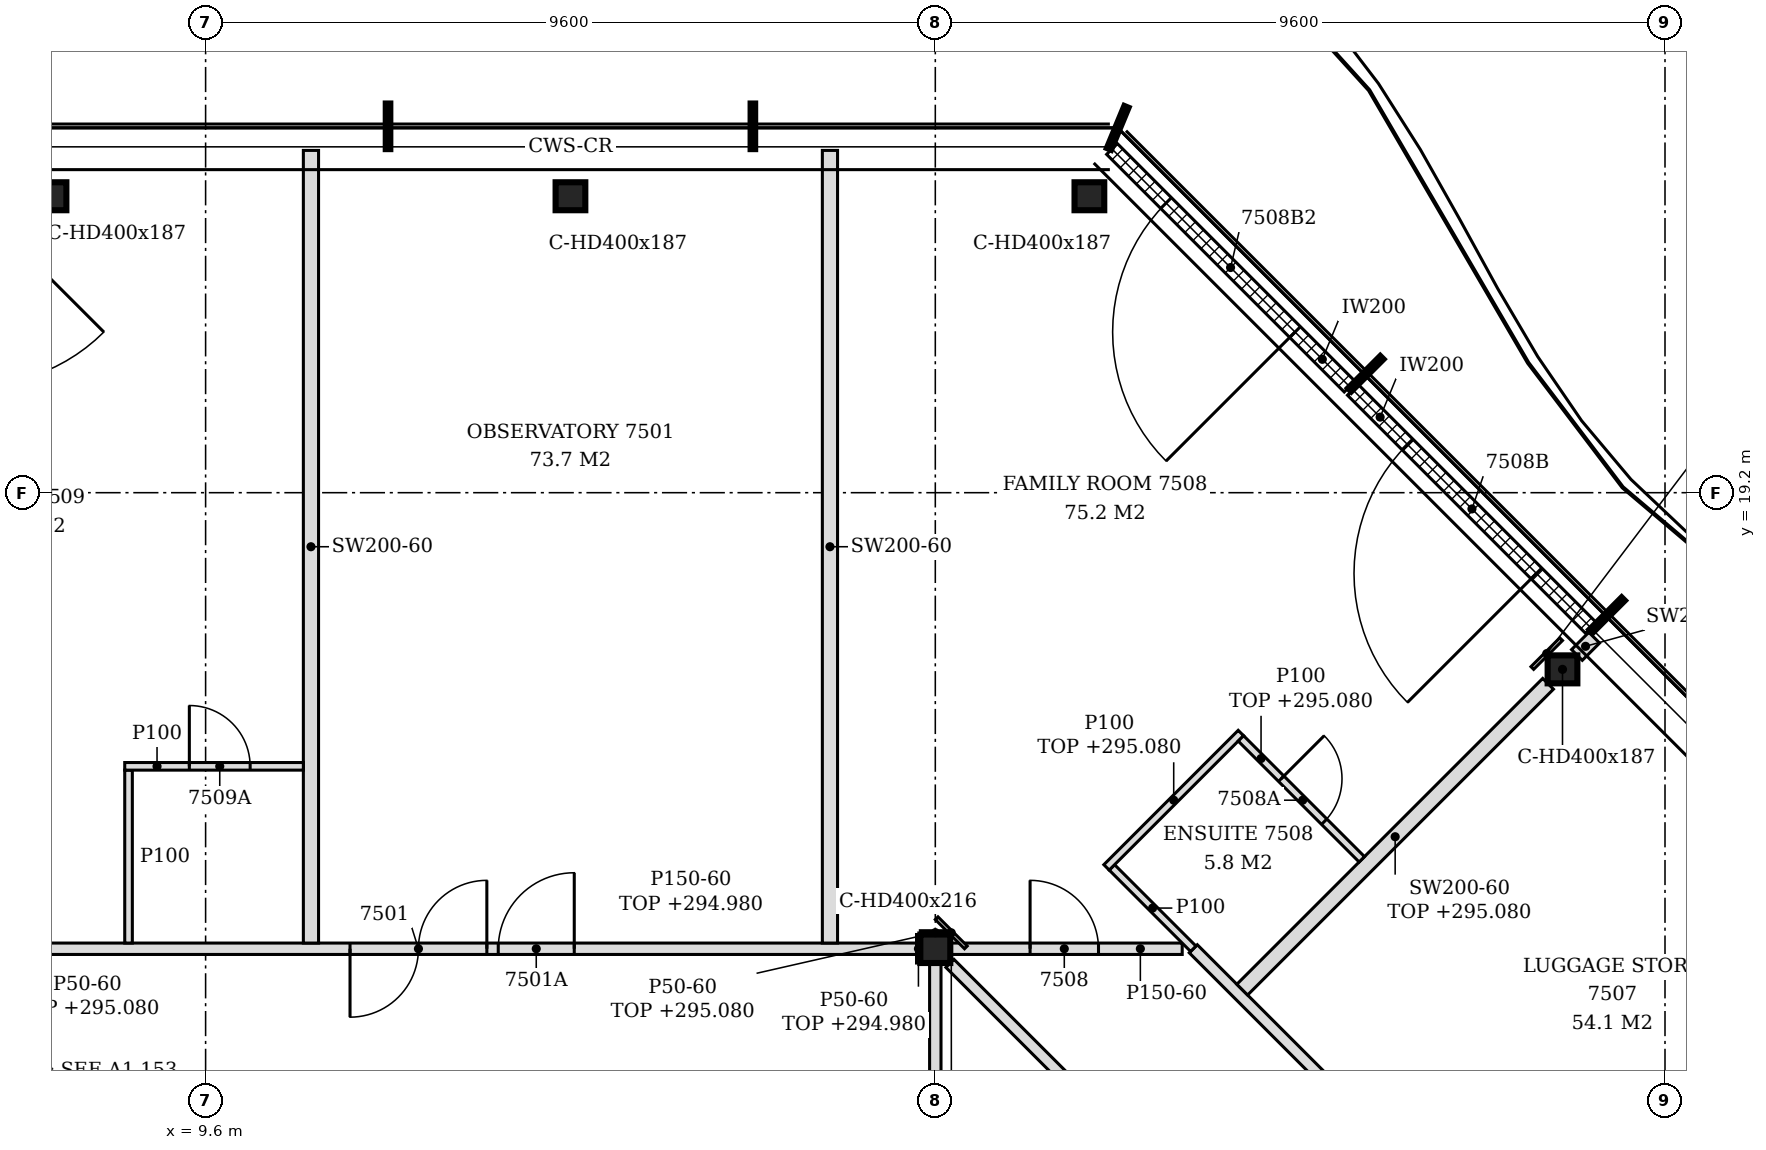
"""IFC4 building model, lengths in metres.
Left out: names, types, materials, properties, quantities, classifications, styles, units other than length and angle.
Written with IfcOpenShell. Run it as: python <this file> out.ifc"""

import sys

from ifc_helpers import new_model, si_unit, direction, frame, frame_2d, origin, origin_2d, place, context, subcontext, project, spatial, polyline, rectangle, i_section, outline, extrude, element, fill, save


model = new_model("IFC4")
c1 = context("Model", 3, precision=1e-05, world=origin(), true_north=direction((0.0, 1.0)))
c2 = subcontext(c1, "Body", "Model", "MODEL_VIEW")
j1 = project(units=[si_unit("LENGTHUNIT", "METRE"), si_unit("PLANEANGLEUNIT", "RADIAN")], contexts=[c1])
p1 = place(None, origin())
s1 = spatial("IfcSite", under=j1, at=p1, CompositionType="ELEMENT")
p2 = place(p1, origin())
s2 = spatial("IfcBuilding", under=s1, at=p2, CompositionType="ELEMENT")
p3 = place(p2, frame((0.0, 0.0, 292.2)))
s3 = spatial("IfcBuildingStorey", under=s2, at=p3, CompositionType="ELEMENT", Elevation=292.2)
for number, where, z_axis, x_axis in (
    (1, (27.451, 16.876, -0.15), (0.0, 0.0, 1.0), (1.0, 0.0, 0.0)),
    (2, (21.227, 23.1, -0.15), (0.0, 0.0, 1.0), (1.0, 0.0, 0.0)),
    (3, (14.4, 23.1, -0.15), (0.0, 0.0, 1.0), (1.0, 0.0, 0.0)),
    (4, (7.573, 23.1, -0.15), (0.0, 0.0, 1.0), (1.0, 0.0, 0.0)),
):
    element("IfcColumn", number, at=place(p3, frame(where, z_axis=z_axis, x_axis=x_axis)), inside=s3, PredefinedType="COLUMN", context=c2, shape_type="SweptSolid", body=[
        extrude(i_section(OverallWidth=0.391, OverallDepth=0.368, WebThickness=0.015, FlangeThickness=0.024, FilletRadius=0.015, at=origin_2d()), origin(), (0.0, 0.0, 1.0), 3.55),
    ])
p4 = place(p3, frame((19.2, 13.2, -0.15), z_axis=(0.0, 0.0, 1.0), x_axis=(1.0, 0.0, 0.0)))
e5 = element("IfcColumn", 5, at=p4, inside=s3, PredefinedType="COLUMN", context=c2, shape_type="SweptSolid", body=[
    extrude(i_section(OverallWidth=0.394, OverallDepth=0.375, WebThickness=0.017, FlangeThickness=0.028, FilletRadius=0.015, at=origin_2d()), origin(), (0.0, 0.0, 1.0), 3.55),
])
p5 = place(p3, frame((27.826, 17.42, 0.0), z_axis=(0.0, 0.0, 1.0), x_axis=(-0.707079231393, 0.707134329907, 0.0)))
e6 = element("IfcWall", 6, at=p5, inside=s3, PredefinedType="NOTDEFINED", context=c2, shape_type="SweptSolid", body=[
    extrude(rectangle(XDim=4.431, YDim=0.2, at=frame_2d((2.215, 0.0))), origin(), (0.0, 0.0, 1.0), 3.4),
])
p6 = place(p5, frame((1.015, 0.0, 0.0)))
e7 = element("IfcOpeningElement", 7, at=p6, cuts=e6, PredefinedType="OPENING", context=c2, shape_type="SweptSolid", body=[
    extrude(rectangle(XDim=2.4, YDim=2.4, at=frame_2d((1.2, 1.2))), frame((0.0, 0.11, 0.0), z_axis=(0.0, -1.0, 0.0), x_axis=(1.0, 0.0, 0.0)), (0.0, 0.0, 1.0), 0.22),
])
p7 = place(p3, frame((24.651, 20.596, 0.0), z_axis=(0.0, 0.0, 1.0), x_axis=(-0.707134392299, 0.707079168996, 0.0)))
e8 = element("IfcWall", 8, at=p7, inside=s3, PredefinedType="NOTDEFINED", context=c2, shape_type="SweptSolid", body=[
    extrude(rectangle(XDim=4.421, YDim=0.2, at=frame_2d((2.21, 0.0))), origin(), (0.0, 0.0, 1.0), 3.4),
])
p8 = place(p7, frame((1.015, 0.0, 0.0)))
e9 = element("IfcOpeningElement", 9, at=p8, cuts=e8, PredefinedType="OPENING", context=c2, shape_type="SweptSolid", body=[
    extrude(rectangle(XDim=2.4, YDim=2.4, at=frame_2d((1.2, 1.2))), frame((0.0, 0.11, 0.0), z_axis=(0.0, -1.0, 0.0), x_axis=(1.0, 0.0, 0.0)), (0.0, 0.0, 1.0), 0.22),
])
p9 = place(p3, frame((19.2, 3.675, 0.0), z_axis=(0.0, 0.0, 1.0), x_axis=(0.0, 1.0, 0.0)))
e10 = element("IfcWall", 10, at=p9, inside=s3, PredefinedType="PARTITIONING", context=c2, shape_type="SweptSolid", body=[
    extrude(rectangle(XDim=9.337, YDim=0.15, at=frame_2d((4.669, 0.0))), origin(), (0.0, 0.0, 1.0), 2.78),
])
p10 = place(p3, frame((28.672, 3.728, 0.0), z_axis=(0.0, 0.0, 1.0), x_axis=(-0.707106781187, 0.707106781187, 0.0)))
e11 = element("IfcWall", 11, at=p10, inside=s3, PredefinedType="PARTITIONING", context=c2, shape_type="SweptSolid", body=[
    extrude(rectangle(XDim=13.124, YDim=0.15, at=frame_2d((6.562, 0.0))), origin(), (0.0, 0.0, 1.0), 2.83),
])
p11 = place(p10, frame((6.157, 0.0, 0.0)))
e12 = element("IfcOpeningElement", 12, at=p11, cuts=e11, PredefinedType="OPENING", context=c2, shape_type="SweptSolid", body=[
    extrude(rectangle(XDim=0.9, YDim=2.1, at=frame_2d((0.45, 1.05))), frame((0.0, 0.085, 0.0), z_axis=(0.0, -1.0, 0.0), x_axis=(1.0, 0.0, 0.0)), (0.0, 0.0, 1.0), 0.17),
])
p12 = place(p3, frame((31.072, 4.722, 0.0), z_axis=(0.0, 0.0, 1.0), x_axis=(-0.707106781187, 0.707106781187, 0.0)))
e13 = element("IfcWall", 13, at=p12, inside=s3, PredefinedType="PARTITIONING", context=c2, shape_type="SweptSolid", body=[
    extrude(rectangle(XDim=11.99, YDim=0.15, at=frame_2d((5.995, 0.0))), origin(), (0.0, 0.0, 1.0), 2.83),
])
p13 = place(p12, frame((1.139, 0.0, 0.0)))
e14 = element("IfcOpeningElement", 14, at=p13, cuts=e13, PredefinedType="OPENING", context=c2, shape_type="SweptSolid", body=[
    extrude(rectangle(XDim=0.9, YDim=2.1, at=frame_2d((0.45, 1.05))), frame((0.0, 0.085, 0.0), z_axis=(0.0, -1.0, 0.0), x_axis=(1.0, 0.0, 0.0)), (0.0, 0.0, 1.0), 0.17),
])
p14 = place(p12, frame((6.806, 0.0, 0.0)))
e15 = element("IfcOpeningElement", 15, at=p14, cuts=e13, PredefinedType="OPENING", context=c2, shape_type="SweptSolid", body=[
    extrude(rectangle(XDim=0.9, YDim=2.1, at=frame_2d((0.45, 1.05))), frame((0.0, 0.085, 0.0), z_axis=(0.0, -1.0, 0.0), x_axis=(1.0, 0.0, 0.0)), (0.0, 0.0, 1.0), 0.17),
])
p15 = place(p3, frame((23.238, 12.662, 0.0), z_axis=(0.0, 0.0, 1.0), x_axis=(0.707106781187, 0.707106781187, 0.0)))
e16 = element("IfcWall", 16, at=p15, inside=s3, PredefinedType="PARTITIONING", context=c2, shape_type="SweptSolid", body=[
    extrude(rectangle(XDim=5.69, YDim=0.2, at=frame_2d((2.845, 0.0))), origin(), (0.0, 0.0, 1.0), 2.88),
])
p16 = place(p3, frame((7.397, 13.2, 0.0), z_axis=(0.0, 0.0, 1.0), x_axis=(1.0, 0.0, 0.0)))
e17 = element("IfcWall", 17, at=p16, inside=s3, PredefinedType="PARTITIONING", context=c2, shape_type="SweptSolid", body=[
    extrude(rectangle(XDim=11.606, YDim=0.15, at=frame_2d((5.803, 0.0))), origin(), (0.0, 0.0, 1.0), 2.78),
])
p17 = place(p16, frame((4.103, 0.0, 0.0)))
e18 = element("IfcOpeningElement", 18, at=p17, cuts=e17, PredefinedType="OPENING", context=c2, shape_type="SweptSolid", body=[
    extrude(rectangle(XDim=1.8, YDim=2.1, at=frame_2d((0.9, 1.05))), frame((0.0, 0.085, 0.0), z_axis=(0.0, -1.0, 0.0), x_axis=(1.0, 0.0, 0.0)), (0.0, 0.0, 1.0), 0.17),
])
p18 = place(p16, frame((6.053, 0.0, 0.0)))
e19 = element("IfcOpeningElement", 19, at=p18, cuts=e17, PredefinedType="OPENING", context=c2, shape_type="SweptSolid", body=[
    extrude(rectangle(XDim=1.0, YDim=2.1, at=frame_2d((0.5, 1.05))), frame((0.0, 0.085, 0.0), z_axis=(0.0, -1.0, 0.0), x_axis=(1.0, 0.0, 0.0)), (0.0, 0.0, 1.0), 0.17),
])
p19 = place(p3, frame((19.397, 13.2, 0.0), z_axis=(0.0, 0.0, 1.0), x_axis=(1.0, 0.0, 0.0)))
e20 = element("IfcWall", 20, at=p19, inside=s3, PredefinedType="PARTITIONING", context=c2, shape_type="SweptSolid", body=[
    extrude(rectangle(XDim=3.051, YDim=0.15, at=frame_2d((1.526, 0.0))), origin(), (0.0, 0.0, 1.0), 3.4),
])
p20 = place(p19, frame((1.05, 0.0, 0.0)))
e21 = element("IfcOpeningElement", 21, at=p20, cuts=e20, PredefinedType="OPENING", context=c2, shape_type="SweptSolid", body=[
    extrude(rectangle(XDim=0.9, YDim=2.1, at=frame_2d((0.45, 1.05))), frame((0.0, 0.085, 0.0), z_axis=(0.0, -1.0, 0.0), x_axis=(1.0, 0.0, 0.0)), (0.0, 0.0, 1.0), 0.17),
])
p21 = place(p3, frame((22.594, 13.2, 0.0), z_axis=(0.0, 0.0, 1.0), x_axis=(-0.707106781187, 0.707106781187, 0.0)))
e22 = element("IfcWall", 22, at=p21, inside=s3, PredefinedType="PARTITIONING", context=c2, shape_type="SweptSolid", body=[
    extrude(rectangle(XDim=1.514, YDim=0.1, at=frame_2d((0.757, 0.0))), origin(), (0.0, 0.0, 1.0), 3.4),
])
p22 = place(p3, frame((8.586, 13.275, 0.0), z_axis=(0.0, 0.0, 1.0), x_axis=(0.0, 1.0, 0.0)))
e23 = element("IfcWall", 23, at=p22, inside=s3, PredefinedType="PARTITIONING", context=c2, shape_type="SweptSolid", body=[
    extrude(outline(polyline([(0.0, 0.0), (2.275, 0.0), (2.275, 3.4), (0.075, 3.4), (0.073, 2.78), (0.0, 2.78), (0.0, 0.0)])), frame((0.0, 0.05, 0.0), z_axis=(0.0, -1.0, 0.0), x_axis=(1.0, 0.0, 0.0)), (0.0, 0.0, 1.0), 0.1),
])
for number, where, z_axis, x_axis in (
    (24, (10.986, 13.275, 0.0), (0.0, 0.0, 1.0), (0.0, 1.0, 0.0)),
    (25, (17.814, 13.275, 0.0), (0.0, 0.0, 1.0), (0.0, 1.0, 0.0)),
):
    element("IfcWall", number, at=place(p3, frame(where, z_axis=z_axis, x_axis=x_axis)), inside=s3, PredefinedType="PARTITIONING", context=c2, shape_type="SweptSolid", body=[
        extrude(outline(polyline([(0.0, 0.0), (10.428, 0.0), (10.428, 3.4), (9.975, 3.4), (9.973, 2.88), (9.675, 2.88), (9.673, 3.4), (6.03, 3.4), (6.028, 2.83), (5.82, 2.83), (5.818, 3.4), (0.075, 3.4), (0.073, 2.78), (0.0, 2.78), (0.0, 0.0)])), frame((0.0, 0.1, 0.0), z_axis=(0.0, -1.0, 0.0), x_axis=(1.0, 0.0, 0.0)), (0.0, 0.0, 1.0), 0.2),
    ])
p23 = place(p3, frame((21.453, 14.271, 0.0), z_axis=(0.0, 0.0, 1.0), x_axis=(0.707057949532, 0.707155609469, 0.0)))
e26 = element("IfcWall", 26, at=p23, inside=s3, PredefinedType="PARTITIONING", context=c2, shape_type="SweptSolid", body=[
    extrude(rectangle(XDim=2.5, YDim=0.1, at=frame_2d((1.25, 0.0))), origin(), (0.0, 0.0, 1.0), 2.88),
])
p24 = place(p3, frame((24.811, 14.377, 0.0), z_axis=(0.0, 0.0, 1.0), x_axis=(-0.707106781187, 0.707106781187, 0.0)))
e27 = element("IfcWall", 27, at=p24, inside=s3, PredefinedType="PARTITIONING", context=c2, shape_type="SweptSolid", body=[
    extrude(rectangle(XDim=2.25, YDim=0.1, at=frame_2d((1.125, 0.0))), origin(), (0.0, 0.0, 1.0), 2.88),
])
p25 = place(p24, frame((0.7, 0.0, 0.0)))
e28 = element("IfcOpeningElement", 28, at=p25, cuts=e27, PredefinedType="OPENING", context=c2, shape_type="SweptSolid", body=[
    extrude(rectangle(XDim=0.8, YDim=2.1, at=frame_2d((0.4, 1.05))), frame((0.0, 0.06, 0.0), z_axis=(0.0, -1.0, 0.0), x_axis=(1.0, 0.0, 0.0)), (0.0, 0.0, 1.0), 0.12),
])
p26 = place(p3, frame((8.536, 15.6, 0.0), z_axis=(0.0, 0.0, 1.0), x_axis=(1.0, 0.0, 0.0)))
e29 = element("IfcWall", 29, at=p26, inside=s3, PredefinedType="PARTITIONING", context=c2, shape_type="SweptSolid", body=[
    extrude(rectangle(XDim=2.35, YDim=0.1, at=frame_2d((1.175, 0.0))), origin(), (0.0, 0.0, 1.0), 3.4),
])
p27 = place(p26, frame((0.85, 0.0, 0.0)))
e30 = element("IfcOpeningElement", 30, at=p27, cuts=e29, PredefinedType="OPENING", context=c2, shape_type="SweptSolid", body=[
    extrude(rectangle(XDim=0.8, YDim=2.1, at=frame_2d((0.4, 1.05))), frame((0.0, 0.06, 0.0), z_axis=(0.0, -1.0, 0.0), x_axis=(1.0, 0.0, 0.0)), (0.0, 0.0, 1.0), 0.12),
])
p28 = place(p3, frame((27.641, 17.065, 0.0), z_axis=(0.0, 0.0, 1.0), x_axis=(0.707106781187, 0.707106781187, 0.0)))
e31 = element("IfcWall", 31, at=p28, inside=s3, PredefinedType="PARTITIONING", context=c2, shape_type="SweptSolid", body=[
    extrude(rectangle(XDim=0.322, YDim=0.2, at=frame_2d((0.161, 0.0))), origin(), (0.0, 0.0, 1.0), 3.4),
])
p29 = place(p3, frame((18.978, 13.012, 0.0), z_axis=(0.0, 0.0, 1.0), x_axis=(0.0, 1.0, 0.0)))
e32 = element("IfcWall", 32, at=p29, inside=s3, PredefinedType="PARTITIONING", context=c2, shape_type="SweptSolid", body=[
    extrude(rectangle(XDim=0.375, YDim=0.05, at=frame_2d((0.188, 0.0))), origin(), (0.0, 0.0, 1.0), 2.78),
])
p30 = place(p3, frame((19.602, 13.218, 0.0), z_axis=(0.0, 0.0, 1.0), x_axis=(-0.707106781187, 0.707106781187, 0.0)))
e33 = element("IfcWall", 33, at=p30, inside=s3, PredefinedType="PARTITIONING", context=c2, shape_type="SweptSolid", body=[
    extrude(rectangle(XDim=0.544, YDim=0.05, at=frame_2d((0.272, 0.0))), origin(), (0.0, 0.0, 1.0), 2.88),
])
p31 = place(p3, frame((27.054, 16.893, 0.0), z_axis=(0.0, 0.0, 1.0), x_axis=(0.707106781187, 0.707106781187, 0.0)))
e34 = element("IfcWall", 34, at=p31, inside=s3, PredefinedType="PARTITIONING", context=c2, shape_type="SweptSolid", body=[
    extrude(rectangle(XDim=0.537, YDim=0.05, at=frame_2d((0.269, 0.0))), origin(), (0.0, 0.0, 1.0), 2.88),
])
p32 = place(p3, frame((19.003, 13.413, 0.0), z_axis=(0.0, 0.0, 1.0), x_axis=(1.0, 0.0, 0.0)))
e35 = element("IfcWall", 35, at=p32, inside=s3, PredefinedType="PARTITIONING", context=c2, shape_type="SweptSolid", body=[
    extrude(rectangle(XDim=0.394, YDim=0.05, at=frame_2d((0.197, 0.0))), origin(), (0.0, 0.0, 1.0), 2.88),
])
p33 = place(p6, origin())
e36 = element("IfcDoor", 36, at=p33, inside=s3, OperationType="SINGLE_SWING_LEFT", PredefinedType="DOOR", context=c2, shape_type="SweptSolid", body=[
    extrude(rectangle(XDim=2.4, YDim=2.4, at=frame_2d((1.2, 1.2))), frame((0.0, 0.025, 0.0), z_axis=(0.0, -1.0, 0.0), x_axis=(1.0, 0.0, 0.0)), (0.0, 0.0, 1.0), 0.05),
])
fill(e7, e36)
p34 = place(p8, origin())
e37 = element("IfcDoor", 37, at=p34, inside=s3, OperationType="SINGLE_SWING_LEFT", PredefinedType="DOOR", context=c2, shape_type="SweptSolid", body=[
    extrude(rectangle(XDim=2.4, YDim=2.4, at=frame_2d((1.2, 1.2))), frame((0.0, 0.025, 0.0), z_axis=(0.0, -1.0, 0.0), x_axis=(1.0, 0.0, 0.0)), (0.0, 0.0, 1.0), 0.05),
])
fill(e9, e37)
p35 = place(p17, origin())
e38 = element("IfcDoor", 38, at=p35, inside=s3, OperationType="DOUBLE_DOOR_SINGLE_SWING", PredefinedType="DOOR", context=c2, shape_type="SweptSolid", body=[
    extrude(rectangle(XDim=1.8, YDim=2.1, at=frame_2d((0.9, 1.05))), frame((0.0, 0.025, 0.0), z_axis=(0.0, -1.0, 0.0), x_axis=(1.0, 0.0, 0.0)), (0.0, 0.0, 1.0), 0.05),
])
fill(e18, e38)
p36 = place(p18, origin())
e39 = element("IfcDoor", 39, at=p36, inside=s3, OperationType="SINGLE_SWING_RIGHT", PredefinedType="DOOR", context=c2, shape_type="SweptSolid", body=[
    extrude(rectangle(XDim=1.0, YDim=2.1, at=frame_2d((0.5, 1.05))), frame((0.0, 0.025, 0.0), z_axis=(0.0, -1.0, 0.0), x_axis=(1.0, 0.0, 0.0)), (0.0, 0.0, 1.0), 0.05),
])
fill(e19, e39)
p37 = place(p20, origin())
e40 = element("IfcDoor", 40, at=p37, inside=s3, OperationType="SINGLE_SWING_LEFT", PredefinedType="DOOR", context=c2, shape_type="SweptSolid", body=[
    extrude(rectangle(XDim=0.9, YDim=2.1, at=frame_2d((0.45, 1.05))), frame((0.0, 0.025, 0.0), z_axis=(0.0, -1.0, 0.0), x_axis=(1.0, 0.0, 0.0)), (0.0, 0.0, 1.0), 0.05),
])
fill(e21, e40)
p38 = place(p25, frame((0.8, 0.0, 0.0), z_axis=(0.0, 0.0, 1.0), x_axis=(-1.0, 0.0, 0.0)))
e41 = element("IfcDoor", 41, at=p38, inside=s3, OperationType="SINGLE_SWING_LEFT", PredefinedType="DOOR", context=c2, shape_type="SweptSolid", body=[
    extrude(rectangle(XDim=0.8, YDim=2.1, at=frame_2d((0.4, 1.05))), frame((0.0, 0.025, 0.0), z_axis=(0.0, -1.0, 0.0), x_axis=(1.0, 0.0, 0.0)), (0.0, 0.0, 1.0), 0.05),
])
fill(e28, e41)
p39 = place(p27, origin())
e42 = element("IfcDoor", 42, at=p39, inside=s3, OperationType="SINGLE_SWING_LEFT", PredefinedType="DOOR", context=c2, shape_type="SweptSolid", body=[
    extrude(rectangle(XDim=0.8, YDim=2.1, at=frame_2d((0.4, 1.05))), frame((0.0, 0.025, 0.0), z_axis=(0.0, -1.0, 0.0), x_axis=(1.0, 0.0, 0.0)), (0.0, 0.0, 1.0), 0.05),
])
fill(e30, e42)
save(model, sys.argv[1])
